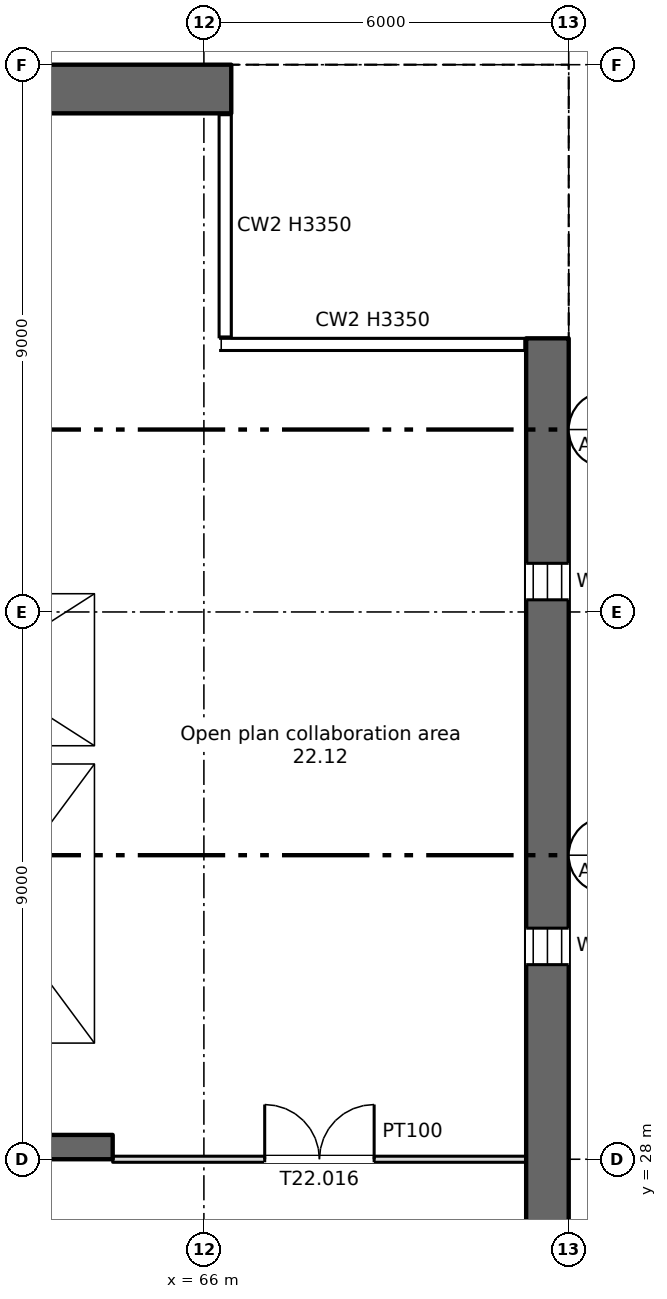
"""IFC4 building model, lengths in metres.
Left out: names, types, materials, properties, quantities, classifications, styles, units other than length and angle.
Written with IfcOpenShell. Run it as: python <this file> out.ifc"""

import sys

from ifc_helpers import new_model, si_unit, direction, frame, frame_2d, origin, place, context, subcontext, project, spatial, rectangle, extrude, element, fill, save


model = new_model("IFC4")
c1 = context("Model", 3, precision=1e-05, world=origin(), true_north=direction((0.0, 1.0)))
c2 = subcontext(c1, "Body", "Model", "MODEL_VIEW")
j1 = project(units=[si_unit("LENGTHUNIT", "METRE"), si_unit("PLANEANGLEUNIT", "RADIAN")], contexts=[c1])
p1 = place(None, origin())
s1 = spatial("IfcSite", under=j1, at=p1, CompositionType="ELEMENT")
p2 = place(p1, origin())
s2 = spatial("IfcBuilding", under=s1, at=p2, CompositionType="ELEMENT")
p3 = place(p2, frame((0.0, 0.0, 147.5)))
s3 = spatial("IfcBuildingStorey", under=s2, at=p3, CompositionType="ELEMENT", Elevation=147.5)
p4 = place(p3, frame((71.65, 6.0, 0.0), z_axis=(0.0, 0.0, 1.0), x_axis=(0.0, 1.0, 0.0)))
e1 = element("IfcWall", 1, at=p4, inside=s3, PredefinedType="SHEAR", context=c2, shape_type="SweptSolid", body=[
    extrude(rectangle(XDim=35.5, YDim=0.7, at=frame_2d((17.75, 0.0))), origin(), (0.0, 0.0, 1.0), 3.35),
])
p5 = place(p4, frame((1.2, 0.0, 0.6)))
e2 = element("IfcOpeningElement", 2, at=p5, cuts=e1, PredefinedType="OPENING", context=c2, shape_type="SweptSolid", body=[
    extrude(rectangle(XDim=0.6, YDim=2.4, at=frame_2d((0.3, 1.2))), frame((0.0, 0.36, 0.0), z_axis=(0.0, -1.0, 0.0), x_axis=(1.0, 0.0, 0.0)), (0.0, 0.0, 1.0), 0.72),
])
p6 = place(p4, frame((7.2, 0.0, 0.6)))
e3 = element("IfcOpeningElement", 3, at=p6, cuts=e1, PredefinedType="OPENING", context=c2, shape_type="SweptSolid", body=[
    extrude(rectangle(XDim=0.6, YDim=2.4, at=frame_2d((0.3, 1.2))), frame((0.0, 0.36, 0.0), z_axis=(0.0, -1.0, 0.0), x_axis=(1.0, 0.0, 0.0)), (0.0, 0.0, 1.0), 0.72),
])
p7 = place(p4, frame((13.2, 0.0, 0.6)))
e4 = element("IfcOpeningElement", 4, at=p7, cuts=e1, PredefinedType="OPENING", context=c2, shape_type="SweptSolid", body=[
    extrude(rectangle(XDim=0.6, YDim=2.4, at=frame_2d((0.3, 1.2))), frame((0.0, 0.36, 0.0), z_axis=(0.0, -1.0, 0.0), x_axis=(1.0, 0.0, 0.0)), (0.0, 0.0, 1.0), 0.72),
])
p8 = place(p4, frame((19.2, 0.0, 0.6)))
e5 = element("IfcOpeningElement", 5, at=p8, cuts=e1, PredefinedType="OPENING", context=c2, shape_type="SweptSolid", body=[
    extrude(rectangle(XDim=0.6, YDim=2.4, at=frame_2d((0.3, 1.2))), frame((0.0, 0.36, 0.0), z_axis=(0.0, -1.0, 0.0), x_axis=(1.0, 0.0, 0.0)), (0.0, 0.0, 1.0), 0.72),
])
p9 = place(p4, frame((25.2, 0.0, 0.6)))
e6 = element("IfcOpeningElement", 6, at=p9, cuts=e1, PredefinedType="OPENING", context=c2, shape_type="SweptSolid", body=[
    extrude(rectangle(XDim=0.6, YDim=2.4, at=frame_2d((0.3, 1.2))), frame((0.0, 0.36, 0.0), z_axis=(0.0, -1.0, 0.0), x_axis=(1.0, 0.0, 0.0)), (0.0, 0.0, 1.0), 0.72),
])
p10 = place(p4, frame((31.2, 0.0, 0.6)))
e7 = element("IfcOpeningElement", 7, at=p10, cuts=e1, PredefinedType="OPENING", context=c2, shape_type="SweptSolid", body=[
    extrude(rectangle(XDim=0.6, YDim=2.4, at=frame_2d((0.3, 1.2))), frame((0.0, 0.36, 0.0), z_axis=(0.0, -1.0, 0.0), x_axis=(1.0, 0.0, 0.0)), (0.0, 0.0, 1.0), 0.72),
])
p11 = place(p3, frame((5.55, 45.6, 0.0), z_axis=(0.0, 0.0, 1.0), x_axis=(1.0, 0.0, 0.0)))
e8 = element("IfcWall", 8, at=p11, inside=s3, PredefinedType="SHEAR", context=c2, shape_type="SweptSolid", body=[
    extrude(rectangle(XDim=60.9, YDim=0.8, at=frame_2d((30.45, 0.0))), origin(), (0.0, 0.0, 1.0), 3.35),
])
p12 = place(p11, frame((1.2, 0.0, 0.6)))
e9 = element("IfcOpeningElement", 9, at=p12, cuts=e8, PredefinedType="OPENING", context=c2, shape_type="SweptSolid", body=[
    extrude(rectangle(XDim=0.6, YDim=2.4, at=frame_2d((0.3, 1.2))), frame((0.0, 0.41, 0.0), z_axis=(0.0, -1.0, 0.0), x_axis=(1.0, 0.0, 0.0)), (0.0, 0.0, 1.0), 0.82),
])
p13 = place(p11, frame((7.2, 0.0, 0.6)))
e10 = element("IfcOpeningElement", 10, at=p13, cuts=e8, PredefinedType="OPENING", context=c2, shape_type="SweptSolid", body=[
    extrude(rectangle(XDim=0.6, YDim=2.4, at=frame_2d((0.3, 1.2))), frame((0.0, 0.41, 0.0), z_axis=(0.0, -1.0, 0.0), x_axis=(1.0, 0.0, 0.0)), (0.0, 0.0, 1.0), 0.82),
])
p14 = place(p3, frame((6.7, 28.2, 0.0), z_axis=(0.0, 0.0, 1.0), x_axis=(1.0, 0.0, 0.0)))
e11 = element("IfcWall", 11, at=p14, inside=s3, PredefinedType="SHEAR", context=c2, shape_type="SweptSolid", body=[
    extrude(rectangle(XDim=57.8, YDim=0.4, at=frame_2d((28.9, 0.0))), origin(), (0.0, 0.0, 1.0), 3.35),
])
p15 = place(p14, frame((13.85, 0.0, 0.0)))
e12 = element("IfcOpeningElement", 12, at=p15, cuts=e11, PredefinedType="OPENING", context=c2, shape_type="SweptSolid", body=[
    extrude(rectangle(XDim=0.9, YDim=2.1, at=frame_2d((0.45, 1.05))), frame((0.0, 0.21, 0.0), z_axis=(0.0, -1.0, 0.0), x_axis=(1.0, 0.0, 0.0)), (0.0, 0.0, 1.0), 0.42),
])
p16 = place(p14, frame((48.562, 0.0, 0.0)))
e13 = element("IfcOpeningElement", 13, at=p16, cuts=e11, PredefinedType="OPENING", context=c2, shape_type="SweptSolid", body=[
    extrude(rectangle(XDim=0.9, YDim=2.1, at=frame_2d((0.45, 1.05))), frame((0.0, 0.21, 0.0), z_axis=(0.0, -1.0, 0.0), x_axis=(1.0, 0.0, 0.0)), (0.0, 0.0, 1.0), 0.42),
])
p17 = place(p14, frame((51.137, 0.0, 0.0)))
e14 = element("IfcOpeningElement", 14, at=p17, cuts=e11, PredefinedType="OPENING", context=c2, shape_type="SweptSolid", body=[
    extrude(rectangle(XDim=0.9, YDim=2.1, at=frame_2d((0.45, 1.05))), frame((0.0, 0.21, 0.0), z_axis=(0.0, -1.0, 0.0), x_axis=(1.0, 0.0, 0.0)), (0.0, 0.0, 1.0), 0.42),
])
p18 = place(p14, frame((1.35, 0.0, 0.0)))
e15 = element("IfcOpeningElement", 15, at=p18, cuts=e11, PredefinedType="OPENING", context=c2, shape_type="SweptSolid", body=[
    extrude(rectangle(XDim=0.9, YDim=2.1, at=frame_2d((0.45, 1.05))), frame((0.0, 0.21, 0.0), z_axis=(0.0, -1.0, 0.0), x_axis=(1.0, 0.0, 0.0)), (0.0, 0.0, 1.0), 0.42),
])
p19 = place(p14, frame((4.7, 0.0, 0.0)))
e16 = element("IfcOpeningElement", 16, at=p19, cuts=e11, PredefinedType="OPENING", context=c2, shape_type="SweptSolid", body=[
    extrude(rectangle(XDim=1.2, YDim=2.1, at=frame_2d((0.6, 1.05))), frame((0.0, 0.21, 0.0), z_axis=(0.0, -1.0, 0.0), x_axis=(1.0, 0.0, 0.0)), (0.0, 0.0, 1.0), 0.42),
])
p20 = place(p14, frame((31.7, 0.0, 0.0)))
e17 = element("IfcOpeningElement", 17, at=p20, cuts=e11, PredefinedType="OPENING", context=c2, shape_type="SweptSolid", body=[
    extrude(rectangle(XDim=1.2, YDim=2.1, at=frame_2d((0.6, 1.05))), frame((0.0, 0.21, 0.0), z_axis=(0.0, -1.0, 0.0), x_axis=(1.0, 0.0, 0.0)), (0.0, 0.0, 1.0), 0.42),
])
p21 = place(p14, frame((55.2, 0.0, 0.0)))
e18 = element("IfcOpeningElement", 18, at=p21, cuts=e11, PredefinedType="OPENING", context=c2, shape_type="SweptSolid", body=[
    extrude(rectangle(XDim=1.2, YDim=2.1, at=frame_2d((0.6, 1.05))), frame((0.0, 0.21, 0.0), z_axis=(0.0, -1.0, 0.0), x_axis=(1.0, 0.0, 0.0)), (0.0, 0.0, 1.0), 0.42),
])
p22 = place(p14, frame((21.7, 0.0, 0.0)))
e19 = element("IfcOpeningElement", 19, at=p22, cuts=e11, PredefinedType="OPENING", context=c2, shape_type="SweptSolid", body=[
    extrude(rectangle(XDim=1.2, YDim=2.1, at=frame_2d((0.6, 1.05))), frame((0.0, 0.21, 0.0), z_axis=(0.0, -1.0, 0.0), x_axis=(1.0, 0.0, 0.0)), (0.0, 0.0, 1.0), 0.42),
])
p23 = place(p14, frame((41.7, 0.0, 0.0)))
e20 = element("IfcOpeningElement", 20, at=p23, cuts=e11, PredefinedType="OPENING", context=c2, shape_type="SweptSolid", body=[
    extrude(rectangle(XDim=1.2, YDim=2.1, at=frame_2d((0.6, 1.05))), frame((0.0, 0.21, 0.0), z_axis=(0.0, -1.0, 0.0), x_axis=(1.0, 0.0, 0.0)), (0.0, 0.0, 1.0), 0.42),
])
p24 = place(p14, frame((24.85, 0.0, 0.0)))
e21 = element("IfcOpeningElement", 21, at=p24, cuts=e11, PredefinedType="OPENING", context=c2, shape_type="SweptSolid", body=[
    extrude(rectangle(XDim=2.4, YDim=2.1, at=frame_2d((1.2, 1.05))), frame((0.0, 0.21, 0.0), z_axis=(0.0, -1.0, 0.0), x_axis=(1.0, 0.0, 0.0)), (0.0, 0.0, 1.0), 0.42),
])
p25 = place(p14, frame((37.35, 0.0, 0.0)))
e22 = element("IfcOpeningElement", 22, at=p25, cuts=e11, PredefinedType="OPENING", context=c2, shape_type="SweptSolid", body=[
    extrude(rectangle(XDim=2.4, YDim=2.1, at=frame_2d((1.2, 1.05))), frame((0.0, 0.21, 0.0), z_axis=(0.0, -1.0, 0.0), x_axis=(1.0, 0.0, 0.0)), (0.0, 0.0, 1.0), 0.42),
])
p26 = place(p14, frame((7.95, 0.0, 0.0)))
e23 = element("IfcOpeningElement", 23, at=p26, cuts=e11, PredefinedType="OPENING", context=c2, shape_type="SweptSolid", body=[
    extrude(rectangle(XDim=2.4, YDim=2.1, at=frame_2d((1.2, 1.05))), frame((0.0, 0.21, 0.0), z_axis=(0.0, -1.0, 0.0), x_axis=(1.0, 0.0, 0.0)), (0.0, 0.0, 1.0), 0.42),
])
p27 = place(p14, frame((28.85, 0.0, 0.0)))
e24 = element("IfcOpeningElement", 24, at=p27, cuts=e11, PredefinedType="OPENING", context=c2, shape_type="SweptSolid", body=[
    extrude(rectangle(XDim=0.9, YDim=2.1, at=frame_2d((0.45, 1.05))), frame((0.0, 0.21, 0.0), z_axis=(0.0, -1.0, 0.0), x_axis=(1.0, 0.0, 0.0)), (0.0, 0.0, 1.0), 0.42),
])
p28 = place(p14, frame((34.85, 0.0, 0.0)))
e25 = element("IfcOpeningElement", 25, at=p28, cuts=e11, PredefinedType="OPENING", context=c2, shape_type="SweptSolid", body=[
    extrude(rectangle(XDim=0.9, YDim=2.1, at=frame_2d((0.45, 1.05))), frame((0.0, 0.21, 0.0), z_axis=(0.0, -1.0, 0.0), x_axis=(1.0, 0.0, 0.0)), (0.0, 0.0, 1.0), 0.42),
])
p29 = place(p3, frame((64.35, 34.8, 0.0), z_axis=(0.0, 0.0, 1.0), x_axis=(0.0, 1.0, 0.0)))
e26 = element("IfcWall", 26, at=p29, inside=s3, PredefinedType="SHEAR", context=c2, shape_type="SweptSolid", body=[
    extrude(rectangle(XDim=10.4, YDim=0.3, at=frame_2d((5.2, 0.0))), origin(), (0.0, 0.0, 1.0), 3.35),
])
p30 = place(p3, frame((64.35, 28.4, 0.0), z_axis=(0.0, 0.0, 1.0), x_axis=(0.0, 1.0, 0.0)))
e27 = element("IfcWall", 27, at=p30, inside=s3, PredefinedType="SHEAR", context=c2, shape_type="SweptSolid", body=[
    extrude(rectangle(XDim=6.1, YDim=0.3, at=frame_2d((3.05, 0.0))), origin(), (0.0, 0.0, 1.0), 3.35),
])
p31 = place(p3, frame((60.3, 34.65, 0.0), z_axis=(0.0, 0.0, 1.0), x_axis=(1.0, 0.0, 0.0)))
e28 = element("IfcWall", 28, at=p31, inside=s3, PredefinedType="SHEAR", context=c2, shape_type="SweptSolid", body=[
    extrude(rectangle(XDim=4.2, YDim=0.3, at=frame_2d((2.1, 0.0))), origin(), (0.0, 0.0, 1.0), 3.35),
])
p32 = place(p3, frame((60.3, 37.45, 0.0), z_axis=(0.0, 0.0, 1.0), x_axis=(1.0, 0.0, 0.0)))
e29 = element("IfcWall", 29, at=p32, inside=s3, PredefinedType="SHEAR", context=c2, shape_type="SweptSolid", body=[
    extrude(rectangle(XDim=3.9, YDim=0.3, at=frame_2d((1.95, 0.0))), origin(), (0.0, 0.0, 1.0), 3.35),
])
p33 = place(p32, frame((1.4, 0.0, 0.0)))
e30 = element("IfcOpeningElement", 30, at=p33, cuts=e29, PredefinedType="OPENING", context=c2, shape_type="SweptSolid", body=[
    extrude(rectangle(XDim=1.1, YDim=2.1, at=frame_2d((0.55, 1.05))), frame((0.0, 0.16, 0.0), z_axis=(0.0, -1.0, 0.0), x_axis=(1.0, 0.0, 0.0)), (0.0, 0.0, 1.0), 0.32),
])
p34 = place(p3, frame((64.5, 28.0, 0.0), z_axis=(0.0, 0.0, 1.0), x_axis=(1.0, 0.0, 0.0)))
e31 = element("IfcWall", 31, at=p34, inside=s3, PredefinedType="PARTITIONING", context=c2, shape_type="SweptSolid", body=[
    extrude(rectangle(XDim=6.8, YDim=0.1, at=frame_2d((3.4, 0.0))), origin(), (0.0, 0.0, 1.0), 3.35),
])
p35 = place(p34, frame((2.5, 0.0, 0.0)))
e32 = element("IfcOpeningElement", 32, at=p35, cuts=e31, PredefinedType="OPENING", context=c2, shape_type="SweptSolid", body=[
    extrude(rectangle(XDim=1.8, YDim=2.1, at=frame_2d((0.9, 1.05))), frame((0.0, 0.06, 0.0), z_axis=(0.0, -1.0, 0.0), x_axis=(1.0, 0.0, 0.0)), (0.0, 0.0, 1.0), 0.12),
])
p36 = place(p9, origin())
e33 = element("IfcWindow", 33, at=p36, inside=s3, PartitioningType="SINGLE_PANEL", PredefinedType="WINDOW", context=c2, shape_type="SweptSolid", body=[
    extrude(rectangle(XDim=0.6, YDim=2.4, at=frame_2d((0.3, 1.2))), frame((0.0, 0.03, 0.0), z_axis=(0.0, -1.0, 0.0), x_axis=(1.0, 0.0, 0.0)), (0.0, 0.0, 1.0), 0.06),
])
fill(e6, e33)
p37 = place(p10, origin())
e34 = element("IfcWindow", 34, at=p37, inside=s3, PartitioningType="SINGLE_PANEL", PredefinedType="WINDOW", context=c2, shape_type="SweptSolid", body=[
    extrude(rectangle(XDim=0.6, YDim=2.4, at=frame_2d((0.3, 1.2))), frame((0.0, 0.03, 0.0), z_axis=(0.0, -1.0, 0.0), x_axis=(1.0, 0.0, 0.0)), (0.0, 0.0, 1.0), 0.06),
])
fill(e7, e34)
p38 = place(p35, origin())
e35 = element("IfcDoor", 35, at=p38, inside=s3, OperationType="DOUBLE_DOOR_SINGLE_SWING", PredefinedType="DOOR", context=c2, shape_type="SweptSolid", body=[
    extrude(rectangle(XDim=1.8, YDim=2.1, at=frame_2d((0.9, 1.05))), frame((0.0, 0.025, 0.0), z_axis=(0.0, -1.0, 0.0), x_axis=(1.0, 0.0, 0.0)), (0.0, 0.0, 1.0), 0.05),
])
fill(e32, e35)
save(model, sys.argv[1])
